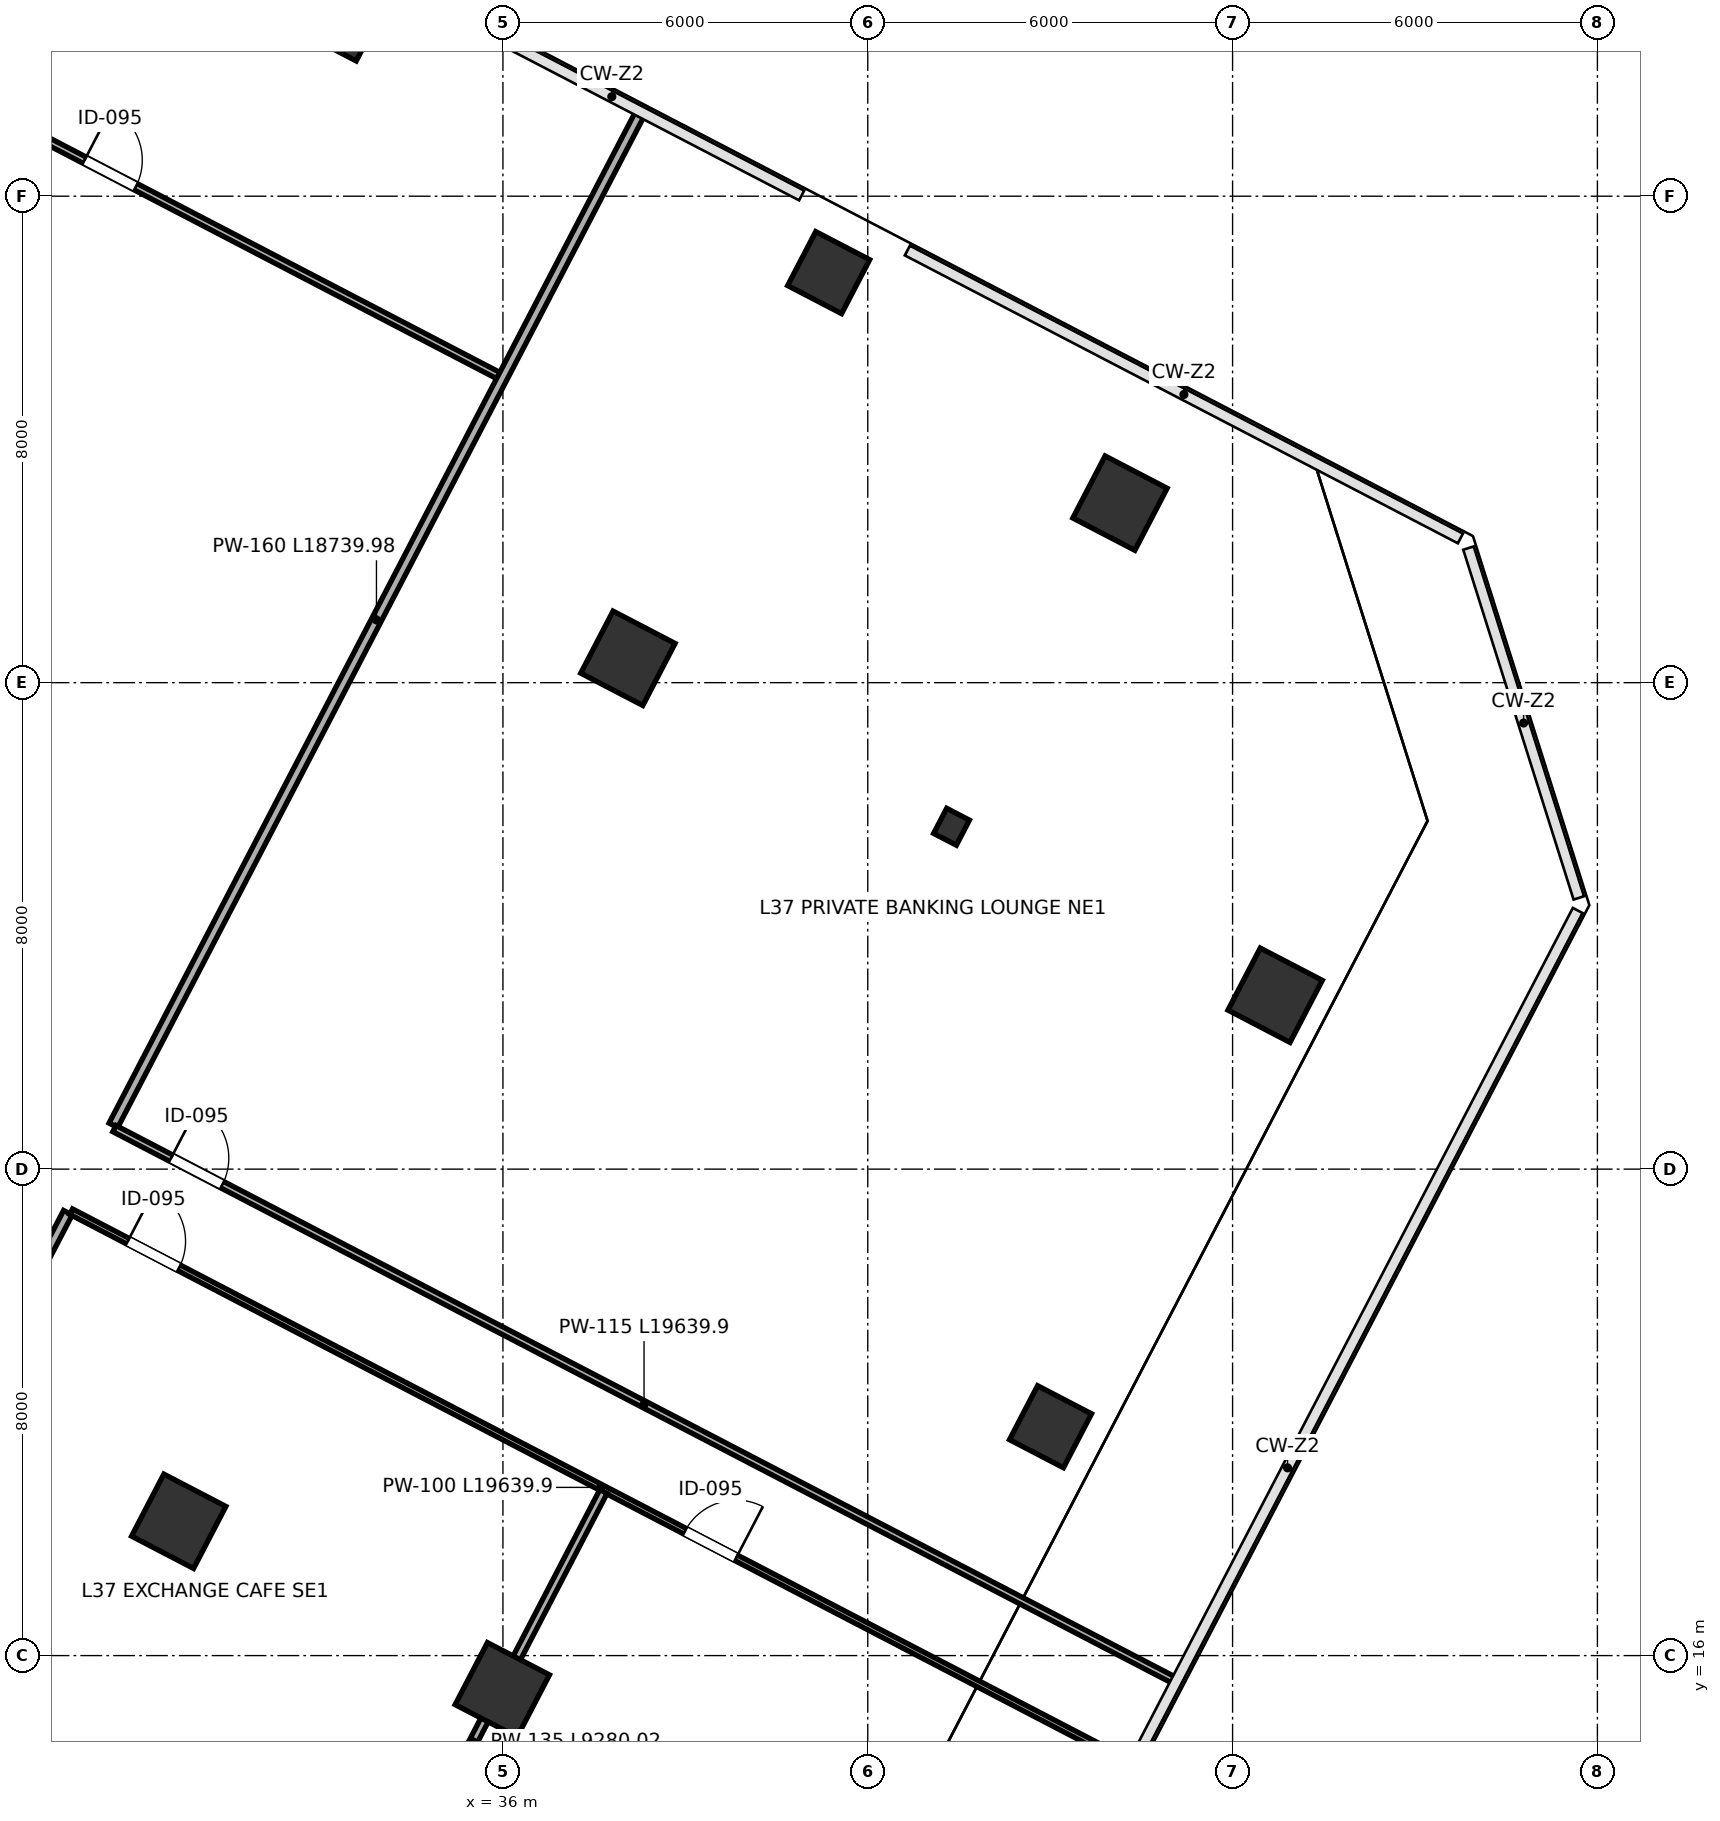
"""IFC4 building model, lengths in metres.
Left out: names, types, materials, properties, quantities, classifications, styles, units other than length and angle.
Written with IfcOpenShell. Run it as: python <this file> out.ifc"""

import sys

from ifc_helpers import new_model, si_unit, direction, frame, frame_2d, origin, origin_2d, place, context, subcontext, project, spatial, rectangle, i_section, extrude, source, transform, mapped, element, fill, save


model = new_model("IFC4")
c1 = context("Model", 3, precision=1e-05, world=origin(), true_north=direction((0.0, 1.0)))
c2 = subcontext(c1, "Body", "Model", "MODEL_VIEW")
j1 = project(units=[si_unit("LENGTHUNIT", "METRE"), si_unit("PLANEANGLEUNIT", "RADIAN")], contexts=[c1])
p1 = place(None, origin())
s1 = spatial("IfcSite", under=j1, at=p1, CompositionType="ELEMENT")
p2 = place(p1, origin())
s2 = spatial("IfcBuilding", under=s1, at=p2, CompositionType="ELEMENT")
p3 = place(p2, frame((0.0, 0.0, 166.6)))
s3 = spatial("IfcBuildingStorey", under=s2, at=p3, CompositionType="ELEMENT", Elevation=166.6)
m1 = source(origin(), c2, "Body", "SweptSolid", [
    extrude(rectangle(XDim=1.0, YDim=1.0, at=origin_2d()), origin(), (0.0, 0.0, 1.0), 4.198),
])
p4 = place(p3, frame((33.374, 42.899, 0.001), z_axis=(0.0, 0.0, 1.0), x_axis=(-0.887010833178, 0.461748613235, 0.0)))
e1 = element("IfcColumn", 1, at=p4, inside=s3, PredefinedType="COLUMN", context=c2, shape_type="MappedRepresentation", body=[
    mapped(m1, transform((0.0, 0.0, 0.0), scale=1.0)),
])
m2 = source(origin(), c2, "Body", "SweptSolid", [
    extrude(rectangle(XDim=1.15, YDim=1.15, at=origin_2d()), origin(), (0.0, 0.0, 1.0), 4.198),
])
for number, where, z_axis, x_axis in (
    (2, (30.668, 18.208, 0.001), (0.0, 0.0, 1.0), (-0.887, 0.462, 0.0)),
    (3, (38.056, 32.401, 0.001), (0.0, 0.0, 1.0), (-0.887, 0.462, 0.0)),
):
    element("IfcColumn", number, at=place(p3, frame(where, z_axis=z_axis, x_axis=x_axis)), inside=s3, PredefinedType="COLUMN", context=c2, shape_type="MappedRepresentation", body=[
        mapped(m2, transform((0.0, 0.0, 0.0), scale=1.0)),
    ])
p5 = place(p3, frame((41.357, 38.743, 0.001), z_axis=(0.0, 0.0, 1.0), x_axis=(-0.887010833178, 0.461748613235, 0.0)))
e4 = element("IfcColumn", 4, at=p5, inside=s3, PredefinedType="COLUMN", context=c2, shape_type="MappedRepresentation", body=[
    mapped(m1, transform((0.0, 0.0, 0.0), scale=1.0)),
])
p6 = place(p3, frame((35.99, 15.438, 0.001), z_axis=(0.0, 0.0, 1.0), x_axis=(-0.887010833178, 0.461748613235, 0.0)))
e5 = element("IfcColumn", 5, at=p6, inside=s3, PredefinedType="COLUMN", context=c2, shape_type="MappedRepresentation", body=[
    mapped(m2, transform((0.0, 0.0, 0.0), scale=1.0)),
])
m3 = source(origin(), c2, "Body", "SweptSolid", [
    extrude(i_section(OverallWidth=0.421, OverallDepth=0.465, WebThickness=0.045, FlangeThickness=0.072, FilletRadius=0.015, at=origin_2d()), origin(), (0.0, 0.0, 1.0), 4.198),
])
p7 = place(p3, frame((43.378, 29.63, 0.001), z_axis=(0.0, 0.0, 1.0), x_axis=(-0.887010833178, 0.461748613235, 0.0)))
e6 = element("IfcColumn", 6, at=p7, inside=s3, PredefinedType="COLUMN", context=c2, shape_type="MappedRepresentation", body=[
    mapped(m3, transform((0.0, 0.0, 0.0), scale=1.0)),
])
p8 = place(p3, frame((46.148, 34.952, 0.001), z_axis=(0.0, 0.0, 1.0), x_axis=(-0.887010833178, 0.461748613235, 0.0)))
e7 = element("IfcColumn", 7, at=p8, inside=s3, PredefinedType="COLUMN", context=c2, shape_type="MappedRepresentation", body=[
    mapped(m2, transform((0.0, 0.0, 0.0), scale=1.0)),
])
p9 = place(p3, frame((45.006, 19.764, 0.001), z_axis=(0.0, 0.0, 1.0), x_axis=(-0.887010833178, 0.461748613235, 0.0)))
e8 = element("IfcColumn", 8, at=p9, inside=s3, PredefinedType="COLUMN", context=c2, shape_type="MappedRepresentation", body=[
    mapped(m1, transform((0.0, 0.0, 0.0), scale=1.0)),
])
m4 = source(origin(), c2, "Body", "SweptSolid", [
    extrude(rectangle(XDim=1.15, YDim=1.15, at=origin_2d()), origin(), (0.0, 0.0, 1.0), 4.198),
])
p10 = place(p3, frame((48.7, 26.86, 0.001), z_axis=(0.0, 0.0, 1.0), x_axis=(-0.887010833178, 0.461748613235, 0.0)))
e9 = element("IfcColumn", 9, at=p10, inside=s3, PredefinedType="COLUMN", context=c2, shape_type="MappedRepresentation", body=[
    mapped(m4, transform((0.0, 0.0, 0.0), scale=1.0)),
])
p11 = place(p3, frame((11.104, 49.971, 0.0), z_axis=(0.0, 0.0, 1.0), x_axis=(0.887010001249, -0.461750211353, 0.0)))
e10 = element("IfcWall", 10, at=p11, inside=s3, PredefinedType="PARTITIONING", context=c2, shape_type="SweptSolid", body=[
    extrude(rectangle(XDim=28.02, YDim=0.115, at=frame_2d((14.01, 0.0))), origin(), (0.0, 0.0, 1.0), 3.96),
])
p12 = place(p11, frame((20.31, 0.0, 0.0)))
e11 = element("IfcOpeningElement", 11, at=p12, cuts=e10, PredefinedType="OPENING", context=c2, shape_type="SweptSolid", body=[
    extrude(rectangle(XDim=0.95, YDim=2.15, at=frame_2d((0.475, 1.075))), frame((0.0, 0.067, 0.0), z_axis=(0.0, -1.0, 0.0), x_axis=(1.0, 0.0, 0.0)), (0.0, 0.0, 1.0), 0.135),
])
p13 = place(p3, frame((29.593, 24.72, 0.0), z_axis=(0.0, 0.0, 1.0), x_axis=(0.461745249096, 0.88701258443, 0.0)))
e12 = element("IfcWall", 12, at=p13, inside=s3, PredefinedType="PARTITIONING", context=c2, shape_type="SweptSolid", body=[
    extrude(rectangle(XDim=18.74, YDim=0.16, at=frame_2d((9.37, 0.0))), origin(), (0.0, 0.0, 1.0), 3.195),
])
p14 = place(p3, frame((22.528, 11.149, 0.0), z_axis=(0.0, 0.0, 1.0), x_axis=(0.461766825398, 0.887001352289, 0.0)))
e13 = element("IfcWall", 13, at=p14, inside=s3, PredefinedType="PARTITIONING", context=c2, shape_type="SweptSolid", body=[
    extrude(rectangle(XDim=13.68, YDim=0.16, at=frame_2d((6.84, 0.0))), origin(), (0.0, 0.0, 1.0), 3.96),
])
p15 = place(p3, frame((29.61, 24.667, 0.0), z_axis=(0.0, 0.0, 1.0), x_axis=(0.887013798673, -0.461742916527, 0.0)))
e14 = element("IfcWall", 14, at=p15, inside=s3, PredefinedType="PARTITIONING", context=c2, shape_type="SweptSolid", body=[
    extrude(rectangle(XDim=19.64, YDim=0.115, at=frame_2d((9.82, 0.0))), origin(), (0.0, 0.0, 1.0), 3.252),
])
p16 = place(p15, frame((1.05, 0.0, 0.0)))
e15 = element("IfcOpeningElement", 15, at=p16, cuts=e14, PredefinedType="OPENING", context=c2, shape_type="SweptSolid", body=[
    extrude(rectangle(XDim=0.95, YDim=2.15, at=frame_2d((0.475, 1.075))), frame((0.0, 0.067, 0.0), z_axis=(0.0, -1.0, 0.0), x_axis=(1.0, 0.0, 0.0)), (0.0, 0.0, 1.0), 0.135),
])
p17 = place(p3, frame((28.899, 23.301, 0.0), z_axis=(0.0, 0.0, 1.0), x_axis=(0.887006056854, -0.461757788353, 0.0)))
e16 = element("IfcWall", 16, at=p17, inside=s3, PredefinedType="PARTITIONING", context=c2, shape_type="SweptSolid", body=[
    extrude(rectangle(XDim=19.64, YDim=0.1, at=frame_2d((9.82, 0.0))), origin(), (0.0, 0.0, 1.0), 3.252),
])
p18 = place(p17, frame((1.05, 0.0, 0.0)))
e17 = element("IfcOpeningElement", 17, at=p18, cuts=e16, PredefinedType="OPENING", context=c2, shape_type="SweptSolid", body=[
    extrude(rectangle(XDim=0.95, YDim=2.15, at=frame_2d((0.475, 1.075))), frame((0.0, 0.06, 0.0), z_axis=(0.0, -1.0, 0.0), x_axis=(1.0, 0.0, 0.0)), (0.0, 0.0, 1.0), 0.12),
])
p19 = place(p17, frame((11.38, 0.0, 0.0)))
e18 = element("IfcOpeningElement", 18, at=p19, cuts=e16, PredefinedType="OPENING", context=c2, shape_type="SweptSolid", body=[
    extrude(rectangle(XDim=0.95, YDim=2.15, at=frame_2d((0.475, 1.075))), frame((0.0, 0.06, 0.0), z_axis=(0.0, -1.0, 0.0), x_axis=(1.0, 0.0, 0.0)), (0.0, 0.0, 1.0), 0.12),
])
p20 = place(p3, frame((33.368, 10.467, 0.0), z_axis=(0.0, 0.0, 1.0), x_axis=(0.461728758034, 0.887021168859, 0.0)))
e19 = element("IfcWall", 19, at=p20, inside=s3, PredefinedType="PARTITIONING", context=c2, shape_type="SweptSolid", body=[
    extrude(rectangle(XDim=9.28, YDim=0.135, at=frame_2d((4.64, 0.0))), origin(), (0.0, 0.0, 1.0), 3.96),
])
m5 = source(origin(), c2, "Body", "SweptSolid", [
    extrude(rectangle(XDim=0.95, YDim=2.15, at=frame_2d((0.475, 1.075))), frame((0.0, 0.025, 0.0), z_axis=(0.0, -1.0, 0.0), x_axis=(1.0, 0.0, 0.0)), (0.0, 0.0, 1.0), 0.05),
])
p21 = place(p12, origin())
e20 = element("IfcDoor", 20, at=p21, inside=s3, OperationType="SINGLE_SWING_LEFT", PredefinedType="DOOR", context=c2, shape_type="MappedRepresentation", body=[
    mapped(m5, transform((0.0, 0.0, 0.0), scale=1.0)),
])
fill(e11, e20)
p22 = place(p16, origin())
e21 = element("IfcDoor", 21, at=p22, inside=s3, OperationType="SINGLE_SWING_LEFT", PredefinedType="DOOR", context=c2, shape_type="MappedRepresentation", body=[
    mapped(m5, transform((0.0, 0.0, 0.0), scale=1.0)),
])
fill(e15, e21)
p23 = place(p18, origin())
e22 = element("IfcDoor", 22, at=p23, inside=s3, OperationType="SINGLE_SWING_LEFT", PredefinedType="DOOR", context=c2, shape_type="MappedRepresentation", body=[
    mapped(m5, transform((0.0, 0.0, 0.0), scale=1.0)),
])
fill(e17, e22)
p24 = place(p19, origin())
e23 = element("IfcDoor", 23, at=p24, inside=s3, OperationType="SINGLE_SWING_RIGHT", PredefinedType="DOOR", context=c2, shape_type="MappedRepresentation", body=[
    mapped(m5, transform((0.0, 0.0, 0.0), scale=1.0)),
])
fill(e18, e23)
save(model, sys.argv[1])
